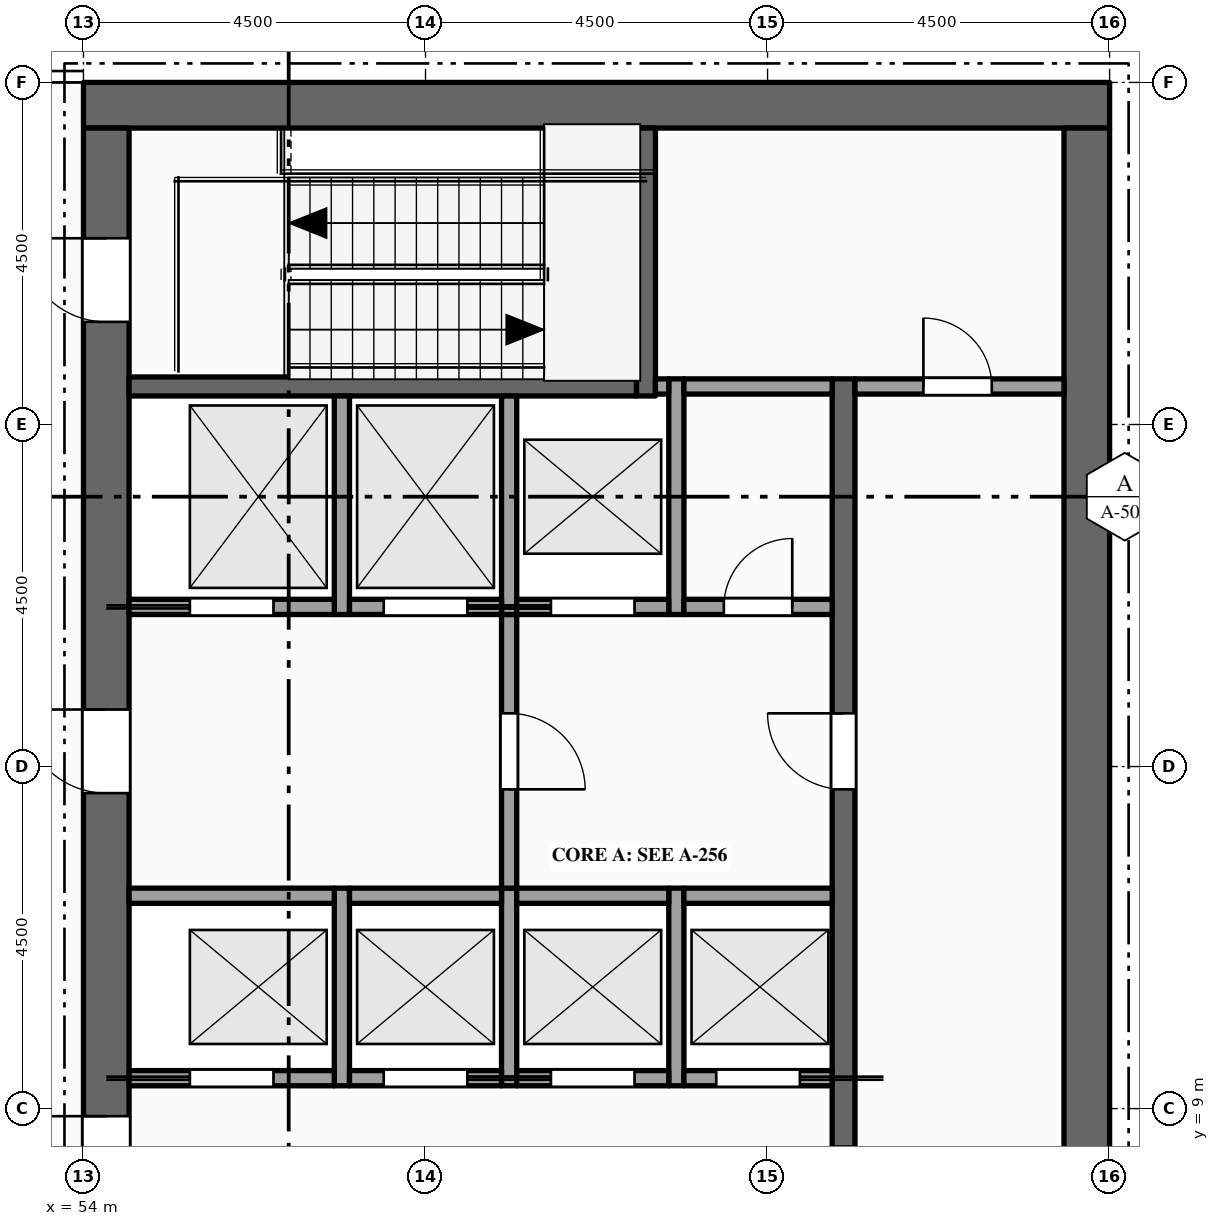
"""IFC4 building model, lengths in metres.
Left out: names, types, materials, properties, quantities, classifications, styles, units other than length and angle.
Written with IfcOpenShell. Run it as: python <this file> out.ifc"""

import sys

from ifc_helpers import new_model, si_unit, direction, frame, frame_2d, origin, place, context, subcontext, project, spatial, rectangle, extrude, element, fill, save


model = new_model("IFC4")
c1 = context("Model", 3, precision=1e-05, world=origin(), true_north=direction((0.0, 1.0)))
c2 = subcontext(c1, "Body", "Model", "MODEL_VIEW")
j1 = project(units=[si_unit("LENGTHUNIT", "METRE"), si_unit("PLANEANGLEUNIT", "RADIAN")], contexts=[c1])
p1 = place(None, origin())
s1 = spatial("IfcSite", under=j1, at=p1, CompositionType="ELEMENT")
p2 = place(p1, origin())
s2 = spatial("IfcBuilding", under=s1, at=p2, CompositionType="ELEMENT")
p3 = place(p2, frame((0.0, 0.0, 314.0)))
s3 = spatial("IfcBuildingStorey", under=s2, at=p3, CompositionType="ELEMENT", Elevation=314.0)
p4 = place(p3, frame((54.0, 22.2, -0.15), z_axis=(0.0, 0.0, 1.0), x_axis=(1.0, 0.0, 0.0)))
e1 = element("IfcWall", 1, at=p4, inside=s3, PredefinedType="SHEAR", context=c2, shape_type="SweptSolid", body=[
    extrude(rectangle(XDim=13.5, YDim=0.6, at=frame_2d((6.75, 0.0))), origin(), (0.0, 0.0, 1.0), 4.5),
])
p5 = place(p3, frame((54.3, 0.6, -0.15), z_axis=(0.0, 0.0, 1.0), x_axis=(0.0, 1.0, 0.0)))
e2 = element("IfcWall", 2, at=p5, inside=s3, PredefinedType="SHEAR", context=c2, shape_type="SweptSolid", body=[
    extrude(rectangle(XDim=21.3, YDim=0.6, at=frame_2d((10.65, 0.0))), origin(), (0.0, 0.0, 1.0), 4.5),
])
p6 = place(p5, frame((6.5, 0.0, 0.15)))
e3 = element("IfcOpeningElement", 3, at=p6, cuts=e2, PredefinedType="OPENING", context=c2, shape_type="SweptSolid", body=[
    extrude(rectangle(XDim=1.8, YDim=2.1, at=frame_2d((0.9, 1.05))), frame((0.0, 0.31, 0.0), z_axis=(0.0, -1.0, 0.0), x_axis=(1.0, 0.0, 0.0)), (0.0, 0.0, 1.0), 0.62),
])
p7 = place(p5, frame((12.55, 0.0, 0.15)))
e4 = element("IfcOpeningElement", 4, at=p7, cuts=e2, PredefinedType="OPENING", context=c2, shape_type="SweptSolid", body=[
    extrude(rectangle(XDim=1.1, YDim=2.1, at=frame_2d((0.55, 1.05))), frame((0.0, 0.31, 0.0), z_axis=(0.0, -1.0, 0.0), x_axis=(1.0, 0.0, 0.0)), (0.0, 0.0, 1.0), 0.62),
])
p8 = place(p5, frame((1.55, 0.0, 0.15)))
e5 = element("IfcOpeningElement", 5, at=p8, cuts=e2, PredefinedType="OPENING", context=c2, shape_type="SweptSolid", body=[
    extrude(rectangle(XDim=1.1, YDim=2.1, at=frame_2d((0.55, 1.05))), frame((0.0, 0.31, 0.0), z_axis=(0.0, -1.0, 0.0), x_axis=(1.0, 0.0, 0.0)), (0.0, 0.0, 1.0), 0.62),
])
p9 = place(p5, frame((18.75, 0.0, 0.15)))
e6 = element("IfcOpeningElement", 6, at=p9, cuts=e2, PredefinedType="OPENING", context=c2, shape_type="SweptSolid", body=[
    extrude(rectangle(XDim=1.1, YDim=2.1, at=frame_2d((0.55, 1.05))), frame((0.0, 0.31, 0.0), z_axis=(0.0, -1.0, 0.0), x_axis=(1.0, 0.0, 0.0)), (0.0, 0.0, 1.0), 0.62),
])
p10 = place(p3, frame((67.2, 0.6, -0.15), z_axis=(0.0, 0.0, 1.0), x_axis=(0.0, 1.0, 0.0)))
e7 = element("IfcWall", 7, at=p10, inside=s3, PredefinedType="SHEAR", context=c2, shape_type="SweptSolid", body=[
    extrude(rectangle(XDim=21.3, YDim=0.6, at=frame_2d((10.65, 0.0))), origin(), (0.0, 0.0, 1.0), 4.5),
])
p11 = place(p3, frame((57.4, 9.3, 0.0), z_axis=(0.0, 0.0, 1.0), x_axis=(0.0, 1.0, 0.0)))
e8 = element("IfcWall", 8, at=p11, inside=s3, PredefinedType="SOLIDWALL", context=c2, shape_type="SweptSolid", body=[
    extrude(rectangle(XDim=2.6, YDim=0.2, at=frame_2d((1.3, 0.0))), origin(), (0.0, 0.0, 1.0), 4.35),
])
p12 = place(p3, frame((57.4, 15.5, 0.0), z_axis=(0.0, 0.0, 1.0), x_axis=(0.0, 1.0, 0.0)))
e9 = element("IfcWall", 9, at=p12, inside=s3, PredefinedType="SOLIDWALL", context=c2, shape_type="SweptSolid", body=[
    extrude(rectangle(XDim=2.875, YDim=0.2, at=frame_2d((1.438, 0.0))), origin(), (0.0, 0.0, 1.0), 4.35),
])
p13 = place(p3, frame((59.6, 9.3, 0.0), z_axis=(0.0, 0.0, 1.0), x_axis=(0.0, 1.0, 0.0)))
e10 = element("IfcWall", 10, at=p13, inside=s3, PredefinedType="SOLIDWALL", context=c2, shape_type="SweptSolid", body=[
    extrude(rectangle(XDim=2.6, YDim=0.2, at=frame_2d((1.3, 0.0))), origin(), (0.0, 0.0, 1.0), 4.35),
])
p14 = place(p3, frame((59.6, 11.9, 0.0), z_axis=(0.0, 0.0, 1.0), x_axis=(0.0, 1.0, 0.0)))
e11 = element("IfcWall", 11, at=p14, inside=s3, PredefinedType="PARTITIONING", context=c2, shape_type="SweptSolid", body=[
    extrude(rectangle(XDim=3.6, YDim=0.2, at=frame_2d((1.8, 0.0))), origin(), (0.0, 0.0, 1.0), 4.35),
])
p15 = place(p14, frame((1.3, 0.0, 0.0)))
e12 = element("IfcOpeningElement", 12, at=p15, cuts=e11, PredefinedType="OPENING", context=c2, shape_type="SweptSolid", body=[
    extrude(rectangle(XDim=1.0, YDim=2.1, at=frame_2d((0.5, 1.05))), frame((0.0, 0.11, 0.0), z_axis=(0.0, -1.0, 0.0), x_axis=(1.0, 0.0, 0.0)), (0.0, 0.0, 1.0), 0.22),
])
p16 = place(p3, frame((59.6, 15.5, 0.0), z_axis=(0.0, 0.0, 1.0), x_axis=(0.0, 1.0, 0.0)))
e13 = element("IfcWall", 13, at=p16, inside=s3, PredefinedType="SOLIDWALL", context=c2, shape_type="SweptSolid", body=[
    extrude(rectangle(XDim=2.875, YDim=0.2, at=frame_2d((1.438, 0.0))), origin(), (0.0, 0.0, 1.0), 4.35),
])
p17 = place(p3, frame((61.4, 18.375, 0.0), z_axis=(0.0, 0.0, 1.0), x_axis=(0.0, 1.0, 0.0)))
e14 = element("IfcWall", 14, at=p17, inside=s3, PredefinedType="SHEAR", context=c2, shape_type="SweptSolid", body=[
    extrude(rectangle(XDim=3.525, YDim=0.25, at=frame_2d((1.762, 0.0))), origin(), (0.0, 0.0, 1.0), 4.35),
])
p18 = place(p3, frame((61.8, 9.3, 0.0), z_axis=(0.0, 0.0, 1.0), x_axis=(0.0, 1.0, 0.0)))
e15 = element("IfcWall", 15, at=p18, inside=s3, PredefinedType="SOLIDWALL", context=c2, shape_type="SweptSolid", body=[
    extrude(rectangle(XDim=2.6, YDim=0.2, at=frame_2d((1.3, 0.0))), origin(), (0.0, 0.0, 1.0), 4.35),
])
p19 = place(p3, frame((61.8, 15.5, 0.0), z_axis=(0.0, 0.0, 1.0), x_axis=(0.0, 1.0, 0.0)))
e16 = element("IfcWall", 16, at=p19, inside=s3, PredefinedType="SOLIDWALL", context=c2, shape_type="SweptSolid", body=[
    extrude(rectangle(XDim=3.1, YDim=0.2, at=frame_2d((1.55, 0.0))), origin(), (0.0, 0.0, 1.0), 4.35),
])
p20 = place(p3, frame((64.0, 4.1, 0.0), z_axis=(0.0, 0.0, 1.0), x_axis=(0.0, 1.0, 0.0)))
e17 = element("IfcWall", 17, at=p20, inside=s3, PredefinedType="SHEAR", context=c2, shape_type="SweptSolid", body=[
    extrude(rectangle(XDim=14.5, YDim=0.3, at=frame_2d((7.25, 0.0))), origin(), (0.0, 0.0, 1.0), 4.35),
])
p21 = place(p20, frame((3.4, 0.0, 0.0)))
e18 = element("IfcOpeningElement", 18, at=p21, cuts=e17, PredefinedType="OPENING", context=c2, shape_type="SweptSolid", body=[
    extrude(rectangle(XDim=1.0, YDim=2.1, at=frame_2d((0.5, 1.05))), frame((0.0, 0.16, 0.0), z_axis=(0.0, -1.0, 0.0), x_axis=(1.0, 0.0, 0.0)), (0.0, 0.0, 1.0), 0.32),
])
p22 = place(p20, frame((9.1, 0.0, 0.0)))
e19 = element("IfcOpeningElement", 19, at=p22, cuts=e17, PredefinedType="OPENING", context=c2, shape_type="SweptSolid", body=[
    extrude(rectangle(XDim=1.0, YDim=2.1, at=frame_2d((0.5, 1.05))), frame((0.0, 0.16, 0.0), z_axis=(0.0, -1.0, 0.0), x_axis=(1.0, 0.0, 0.0)), (0.0, 0.0, 1.0), 0.32),
])
p23 = place(p3, frame((54.6, 9.4, 0.0), z_axis=(0.0, 0.0, 1.0), x_axis=(1.0, 0.0, 0.0)))
e20 = element("IfcWall", 20, at=p23, inside=s3, PredefinedType="SOLIDWALL", context=c2, shape_type="SweptSolid", body=[
    extrude(rectangle(XDim=2.7, YDim=0.2, at=frame_2d((1.35, 0.0))), origin(), (0.0, 0.0, 1.0), 4.35),
])
p24 = place(p23, frame((0.8, 0.0, 0.012)))
e21 = element("IfcOpeningElement", 21, at=p24, cuts=e20, PredefinedType="OPENING", context=c2, shape_type="SweptSolid", body=[
    extrude(rectangle(XDim=1.1, YDim=2.1, at=frame_2d((0.55, 1.05))), frame((0.0, 0.11, 0.0), z_axis=(0.0, -1.0, 0.0), x_axis=(1.0, 0.0, 0.0)), (0.0, 0.0, 1.0), 0.22),
])
p25 = place(p3, frame((57.5, 9.4, 0.0), z_axis=(0.0, 0.0, 1.0), x_axis=(1.0, 0.0, 0.0)))
e22 = element("IfcWall", 22, at=p25, inside=s3, PredefinedType="SOLIDWALL", context=c2, shape_type="SweptSolid", body=[
    extrude(rectangle(XDim=2.0, YDim=0.2, at=frame_2d((1.0, 0.0))), origin(), (0.0, 0.0, 1.0), 4.35),
])
p26 = place(p25, frame((0.45, 0.0, 0.012)))
e23 = element("IfcOpeningElement", 23, at=p26, cuts=e22, PredefinedType="OPENING", context=c2, shape_type="SweptSolid", body=[
    extrude(rectangle(XDim=1.1, YDim=2.1, at=frame_2d((0.55, 1.05))), frame((0.0, 0.11, 0.0), z_axis=(0.0, -1.0, 0.0), x_axis=(1.0, 0.0, 0.0)), (0.0, 0.0, 1.0), 0.22),
])
p27 = place(p3, frame((59.7, 9.4, 0.0), z_axis=(0.0, 0.0, 1.0), x_axis=(1.0, 0.0, 0.0)))
e24 = element("IfcWall", 24, at=p27, inside=s3, PredefinedType="SOLIDWALL", context=c2, shape_type="SweptSolid", body=[
    extrude(rectangle(XDim=2.0, YDim=0.2, at=frame_2d((1.0, 0.0))), origin(), (0.0, 0.0, 1.0), 4.35),
])
p28 = place(p27, frame((0.45, 0.0, 0.012)))
e25 = element("IfcOpeningElement", 25, at=p28, cuts=e24, PredefinedType="OPENING", context=c2, shape_type="SweptSolid", body=[
    extrude(rectangle(XDim=1.1, YDim=2.1, at=frame_2d((0.55, 1.05))), frame((0.0, 0.11, 0.0), z_axis=(0.0, -1.0, 0.0), x_axis=(1.0, 0.0, 0.0)), (0.0, 0.0, 1.0), 0.22),
])
p29 = place(p3, frame((61.9, 9.4, 0.0), z_axis=(0.0, 0.0, 1.0), x_axis=(1.0, 0.0, 0.0)))
e26 = element("IfcWall", 26, at=p29, inside=s3, PredefinedType="SOLIDWALL", context=c2, shape_type="SweptSolid", body=[
    extrude(rectangle(XDim=1.95, YDim=0.2, at=frame_2d((0.975, 0.0))), origin(), (0.0, 0.0, 1.0), 4.35),
])
p30 = place(p29, frame((0.425, 0.0, 0.012)))
e27 = element("IfcOpeningElement", 27, at=p30, cuts=e26, PredefinedType="OPENING", context=c2, shape_type="SweptSolid", body=[
    extrude(rectangle(XDim=1.1, YDim=2.1, at=frame_2d((0.55, 1.05))), frame((0.0, 0.11, 0.0), z_axis=(0.0, -1.0, 0.0), x_axis=(1.0, 0.0, 0.0)), (0.0, 0.0, 1.0), 0.22),
])
p31 = place(p3, frame((54.6, 11.8, 0.0), z_axis=(0.0, 0.0, 1.0), x_axis=(1.0, 0.0, 0.0)))
e28 = element("IfcWall", 28, at=p31, inside=s3, PredefinedType="SOLIDWALL", context=c2, shape_type="SweptSolid", body=[
    extrude(rectangle(XDim=2.7, YDim=0.2, at=frame_2d((1.35, 0.0))), origin(), (0.0, 0.0, 1.0), 4.35),
])
for number, where, z_axis, x_axis in (
    (29, (57.5, 11.8, 0.0), (0.0, 0.0, 1.0), (1.0, 0.0, 0.0)),
    (30, (59.7, 11.8, 0.0), (0.0, 0.0, 1.0), (1.0, 0.0, 0.0)),
):
    element("IfcWall", number, at=place(p3, frame(where, z_axis=z_axis, x_axis=x_axis)), inside=s3, PredefinedType="SOLIDWALL", context=c2, shape_type="SweptSolid", body=[
        extrude(rectangle(XDim=2.0, YDim=0.2, at=frame_2d((1.0, 0.0))), origin(), (0.0, 0.0, 1.0), 4.35),
    ])
p32 = place(p3, frame((61.9, 11.8, 0.0), z_axis=(0.0, 0.0, 1.0), x_axis=(1.0, 0.0, 0.0)))
e31 = element("IfcWall", 31, at=p32, inside=s3, PredefinedType="SOLIDWALL", context=c2, shape_type="SweptSolid", body=[
    extrude(rectangle(XDim=1.95, YDim=0.2, at=frame_2d((0.975, 0.0))), origin(), (0.0, 0.0, 1.0), 4.35),
])
p33 = place(p3, frame((54.6, 15.6, 0.0), z_axis=(0.0, 0.0, 1.0), x_axis=(1.0, 0.0, 0.0)))
e32 = element("IfcWall", 32, at=p33, inside=s3, PredefinedType="SOLIDWALL", context=c2, shape_type="SweptSolid", body=[
    extrude(rectangle(XDim=2.7, YDim=0.2, at=frame_2d((1.35, 0.0))), origin(), (0.0, 0.0, 1.0), 4.35),
])
p34 = place(p33, frame((0.8, 0.0, 0.012)))
e33 = element("IfcOpeningElement", 33, at=p34, cuts=e32, PredefinedType="OPENING", context=c2, shape_type="SweptSolid", body=[
    extrude(rectangle(XDim=1.1, YDim=2.1, at=frame_2d((0.55, 1.05))), frame((0.0, 0.11, 0.0), z_axis=(0.0, -1.0, 0.0), x_axis=(1.0, 0.0, 0.0)), (0.0, 0.0, 1.0), 0.22),
])
p35 = place(p3, frame((57.5, 15.6, 0.0), z_axis=(0.0, 0.0, 1.0), x_axis=(1.0, 0.0, 0.0)))
e34 = element("IfcWall", 34, at=p35, inside=s3, PredefinedType="SOLIDWALL", context=c2, shape_type="SweptSolid", body=[
    extrude(rectangle(XDim=2.0, YDim=0.2, at=frame_2d((1.0, 0.0))), origin(), (0.0, 0.0, 1.0), 4.35),
])
p36 = place(p35, frame((0.45, 0.0, 0.012)))
e35 = element("IfcOpeningElement", 35, at=p36, cuts=e34, PredefinedType="OPENING", context=c2, shape_type="SweptSolid", body=[
    extrude(rectangle(XDim=1.1, YDim=2.1, at=frame_2d((0.55, 1.05))), frame((0.0, 0.11, 0.0), z_axis=(0.0, -1.0, 0.0), x_axis=(1.0, 0.0, 0.0)), (0.0, 0.0, 1.0), 0.22),
])
p37 = place(p3, frame((59.7, 15.6, 0.0), z_axis=(0.0, 0.0, 1.0), x_axis=(1.0, 0.0, 0.0)))
e36 = element("IfcWall", 36, at=p37, inside=s3, PredefinedType="SOLIDWALL", context=c2, shape_type="SweptSolid", body=[
    extrude(rectangle(XDim=2.0, YDim=0.2, at=frame_2d((1.0, 0.0))), origin(), (0.0, 0.0, 1.0), 4.35),
])
p38 = place(p37, frame((0.45, 0.0, 0.012)))
e37 = element("IfcOpeningElement", 37, at=p38, cuts=e36, PredefinedType="OPENING", context=c2, shape_type="SweptSolid", body=[
    extrude(rectangle(XDim=1.1, YDim=2.1, at=frame_2d((0.55, 1.05))), frame((0.0, 0.11, 0.0), z_axis=(0.0, -1.0, 0.0), x_axis=(1.0, 0.0, 0.0)), (0.0, 0.0, 1.0), 0.22),
])
p39 = place(p3, frame((61.9, 15.6, 0.0), z_axis=(0.0, 0.0, 1.0), x_axis=(1.0, 0.0, 0.0)))
e38 = element("IfcWall", 38, at=p39, inside=s3, PredefinedType="PARTITIONING", context=c2, shape_type="SweptSolid", body=[
    extrude(rectangle(XDim=1.95, YDim=0.2, at=frame_2d((0.975, 0.0))), origin(), (0.0, 0.0, 1.0), 4.35),
])
p40 = place(p39, frame((0.525, 0.0, 0.0)))
e39 = element("IfcOpeningElement", 39, at=p40, cuts=e38, PredefinedType="OPENING", context=c2, shape_type="SweptSolid", body=[
    extrude(rectangle(XDim=0.9, YDim=2.1, at=frame_2d((0.45, 1.05))), frame((0.0, 0.11, 0.0), z_axis=(0.0, -1.0, 0.0), x_axis=(1.0, 0.0, 0.0)), (0.0, 0.0, 1.0), 0.22),
])
p41 = place(p3, frame((54.6, 18.5, 0.0), z_axis=(0.0, 0.0, 1.0), x_axis=(1.0, 0.0, 0.0)))
e40 = element("IfcWall", 40, at=p41, inside=s3, PredefinedType="SHEAR", context=c2, shape_type="SweptSolid", body=[
    extrude(rectangle(XDim=6.675, YDim=0.25, at=frame_2d((3.337, 0.0))), origin(), (0.0, 0.0, 1.0), 4.35),
])
p42 = place(p3, frame((61.525, 18.5, 0.0), z_axis=(0.0, 0.0, 1.0), x_axis=(1.0, 0.0, 0.0)))
e41 = element("IfcWall", 41, at=p42, inside=s3, PredefinedType="SOLIDWALL", context=c2, shape_type="SweptSolid", body=[
    extrude(rectangle(XDim=0.175, YDim=0.2, at=frame_2d((0.087, 0.0))), origin(), (0.0, 0.0, 1.0), 4.35),
])
p43 = place(p3, frame((61.9, 18.5, 0.0), z_axis=(0.0, 0.0, 1.0), x_axis=(1.0, 0.0, 0.0)))
e42 = element("IfcWall", 42, at=p43, inside=s3, PredefinedType="PARTITIONING", context=c2, shape_type="SweptSolid", body=[
    extrude(rectangle(XDim=1.95, YDim=0.2, at=frame_2d((0.975, 0.0))), origin(), (0.0, 0.0, 1.0), 4.35),
])
p44 = place(p3, frame((64.15, 18.5, 0.0), z_axis=(0.0, 0.0, 1.0), x_axis=(1.0, 0.0, 0.0)))
e43 = element("IfcWall", 43, at=p44, inside=s3, PredefinedType="PARTITIONING", context=c2, shape_type="SweptSolid", body=[
    extrude(rectangle(XDim=2.75, YDim=0.2, at=frame_2d((1.375, 0.0))), origin(), (0.0, 0.0, 1.0), 4.35),
])
p45 = place(p44, frame((0.9, 0.0, 0.0)))
e44 = element("IfcOpeningElement", 44, at=p45, cuts=e43, PredefinedType="OPENING", context=c2, shape_type="SweptSolid", body=[
    extrude(rectangle(XDim=0.9, YDim=2.1, at=frame_2d((0.45, 1.05))), frame((0.0, 0.11, 0.0), z_axis=(0.0, -1.0, 0.0), x_axis=(1.0, 0.0, 0.0)), (0.0, 0.0, 1.0), 0.22),
])
p46 = place(p24, origin())
e45 = element("IfcDoor", 45, at=p46, inside=s3, OperationType="SLIDING_TO_LEFT", PredefinedType="DOOR", context=c2, shape_type="SweptSolid", body=[
    extrude(rectangle(XDim=1.1, YDim=2.1, at=frame_2d((0.55, 1.05))), frame((0.0, 0.025, 0.0), z_axis=(0.0, -1.0, 0.0), x_axis=(1.0, 0.0, 0.0)), (0.0, 0.0, 1.0), 0.05),
])
fill(e21, e45)
p47 = place(p26, origin())
e46 = element("IfcDoor", 46, at=p47, inside=s3, OperationType="SLIDING_TO_RIGHT", PredefinedType="DOOR", context=c2, shape_type="SweptSolid", body=[
    extrude(rectangle(XDim=1.1, YDim=2.1, at=frame_2d((0.55, 1.05))), frame((0.0, 0.025, 0.0), z_axis=(0.0, -1.0, 0.0), x_axis=(1.0, 0.0, 0.0)), (0.0, 0.0, 1.0), 0.05),
])
fill(e23, e46)
p48 = place(p28, origin())
e47 = element("IfcDoor", 47, at=p48, inside=s3, OperationType="SLIDING_TO_LEFT", PredefinedType="DOOR", context=c2, shape_type="SweptSolid", body=[
    extrude(rectangle(XDim=1.1, YDim=2.1, at=frame_2d((0.55, 1.05))), frame((0.0, 0.025, 0.0), z_axis=(0.0, -1.0, 0.0), x_axis=(1.0, 0.0, 0.0)), (0.0, 0.0, 1.0), 0.05),
])
fill(e25, e47)
p49 = place(p30, origin())
e48 = element("IfcDoor", 48, at=p49, inside=s3, OperationType="SLIDING_TO_RIGHT", PredefinedType="DOOR", context=c2, shape_type="SweptSolid", body=[
    extrude(rectangle(XDim=1.1, YDim=2.1, at=frame_2d((0.55, 1.05))), frame((0.0, 0.025, 0.0), z_axis=(0.0, -1.0, 0.0), x_axis=(1.0, 0.0, 0.0)), (0.0, 0.0, 1.0), 0.05),
])
fill(e27, e48)
p50 = place(p34, origin())
e49 = element("IfcDoor", 49, at=p50, inside=s3, OperationType="SLIDING_TO_LEFT", PredefinedType="DOOR", context=c2, shape_type="SweptSolid", body=[
    extrude(rectangle(XDim=1.1, YDim=2.1, at=frame_2d((0.55, 1.05))), frame((0.0, 0.025, 0.0), z_axis=(0.0, -1.0, 0.0), x_axis=(1.0, 0.0, 0.0)), (0.0, 0.0, 1.0), 0.05),
])
fill(e33, e49)
p51 = place(p36, origin())
e50 = element("IfcDoor", 50, at=p51, inside=s3, OperationType="SLIDING_TO_RIGHT", PredefinedType="DOOR", context=c2, shape_type="SweptSolid", body=[
    extrude(rectangle(XDim=1.1, YDim=2.1, at=frame_2d((0.55, 1.05))), frame((0.0, 0.025, 0.0), z_axis=(0.0, -1.0, 0.0), x_axis=(1.0, 0.0, 0.0)), (0.0, 0.0, 1.0), 0.05),
])
fill(e35, e50)
p52 = place(p38, origin())
e51 = element("IfcDoor", 51, at=p52, inside=s3, OperationType="SLIDING_TO_LEFT", PredefinedType="DOOR", context=c2, shape_type="SweptSolid", body=[
    extrude(rectangle(XDim=1.1, YDim=2.1, at=frame_2d((0.55, 1.05))), frame((0.0, 0.025, 0.0), z_axis=(0.0, -1.0, 0.0), x_axis=(1.0, 0.0, 0.0)), (0.0, 0.0, 1.0), 0.05),
])
fill(e37, e51)
p53 = place(p6, origin())
e52 = element("IfcDoor", 52, at=p53, inside=s3, OperationType="DOUBLE_DOOR_SINGLE_SWING", PredefinedType="DOOR", context=c2, shape_type="SweptSolid", body=[
    extrude(rectangle(XDim=1.8, YDim=2.1, at=frame_2d((0.9, 1.05))), frame((0.0, 0.025, 0.0), z_axis=(0.0, -1.0, 0.0), x_axis=(1.0, 0.0, 0.0)), (0.0, 0.0, 1.0), 0.05),
])
fill(e3, e52)
p54 = place(p7, origin())
e53 = element("IfcDoor", 53, at=p54, inside=s3, OperationType="SINGLE_SWING_RIGHT", PredefinedType="DOOR", context=c2, shape_type="SweptSolid", body=[
    extrude(rectangle(XDim=1.1, YDim=2.1, at=frame_2d((0.55, 1.05))), frame((0.0, 0.025, 0.0), z_axis=(0.0, -1.0, 0.0), x_axis=(1.0, 0.0, 0.0)), (0.0, 0.0, 1.0), 0.05),
])
fill(e4, e53)
p55 = place(p15, origin())
e54 = element("IfcDoor", 54, at=p55, inside=s3, OperationType="SINGLE_SWING_LEFT", PredefinedType="DOOR", context=c2, shape_type="SweptSolid", body=[
    extrude(rectangle(XDim=1.0, YDim=2.1, at=frame_2d((0.5, 1.05))), frame((0.0, 0.025, 0.0), z_axis=(0.0, -1.0, 0.0), x_axis=(1.0, 0.0, 0.0)), (0.0, 0.0, 1.0), 0.05),
])
fill(e12, e54)
p56 = place(p22, origin())
e55 = element("IfcDoor", 55, at=p56, inside=s3, OperationType="SINGLE_SWING_RIGHT", PredefinedType="DOOR", context=c2, shape_type="SweptSolid", body=[
    extrude(rectangle(XDim=1.0, YDim=2.1, at=frame_2d((0.5, 1.05))), frame((0.0, 0.025, 0.0), z_axis=(0.0, -1.0, 0.0), x_axis=(1.0, 0.0, 0.0)), (0.0, 0.0, 1.0), 0.05),
])
fill(e19, e55)
p57 = place(p9, origin())
e56 = element("IfcDoor", 56, at=p57, inside=s3, OperationType="SINGLE_SWING_RIGHT", PredefinedType="DOOR", context=c2, shape_type="SweptSolid", body=[
    extrude(rectangle(XDim=1.1, YDim=2.1, at=frame_2d((0.55, 1.05))), frame((0.0, 0.025, 0.0), z_axis=(0.0, -1.0, 0.0), x_axis=(1.0, 0.0, 0.0)), (0.0, 0.0, 1.0), 0.05),
])
fill(e6, e56)
p58 = place(p45, origin())
e57 = element("IfcDoor", 57, at=p58, inside=s3, OperationType="SINGLE_SWING_LEFT", PredefinedType="DOOR", context=c2, shape_type="SweptSolid", body=[
    extrude(rectangle(XDim=0.9, YDim=2.1, at=frame_2d((0.45, 1.05))), frame((0.0, 0.025, 0.0), z_axis=(0.0, -1.0, 0.0), x_axis=(1.0, 0.0, 0.0)), (0.0, 0.0, 1.0), 0.05),
])
fill(e44, e57)
p59 = place(p40, origin())
e58 = element("IfcDoor", 58, at=p59, inside=s3, OperationType="SINGLE_SWING_RIGHT", PredefinedType="DOOR", context=c2, shape_type="SweptSolid", body=[
    extrude(rectangle(XDim=0.9, YDim=2.1, at=frame_2d((0.45, 1.05))), frame((0.0, 0.025, 0.0), z_axis=(0.0, -1.0, 0.0), x_axis=(1.0, 0.0, 0.0)), (0.0, 0.0, 1.0), 0.05),
])
fill(e39, e58)
save(model, sys.argv[1])
